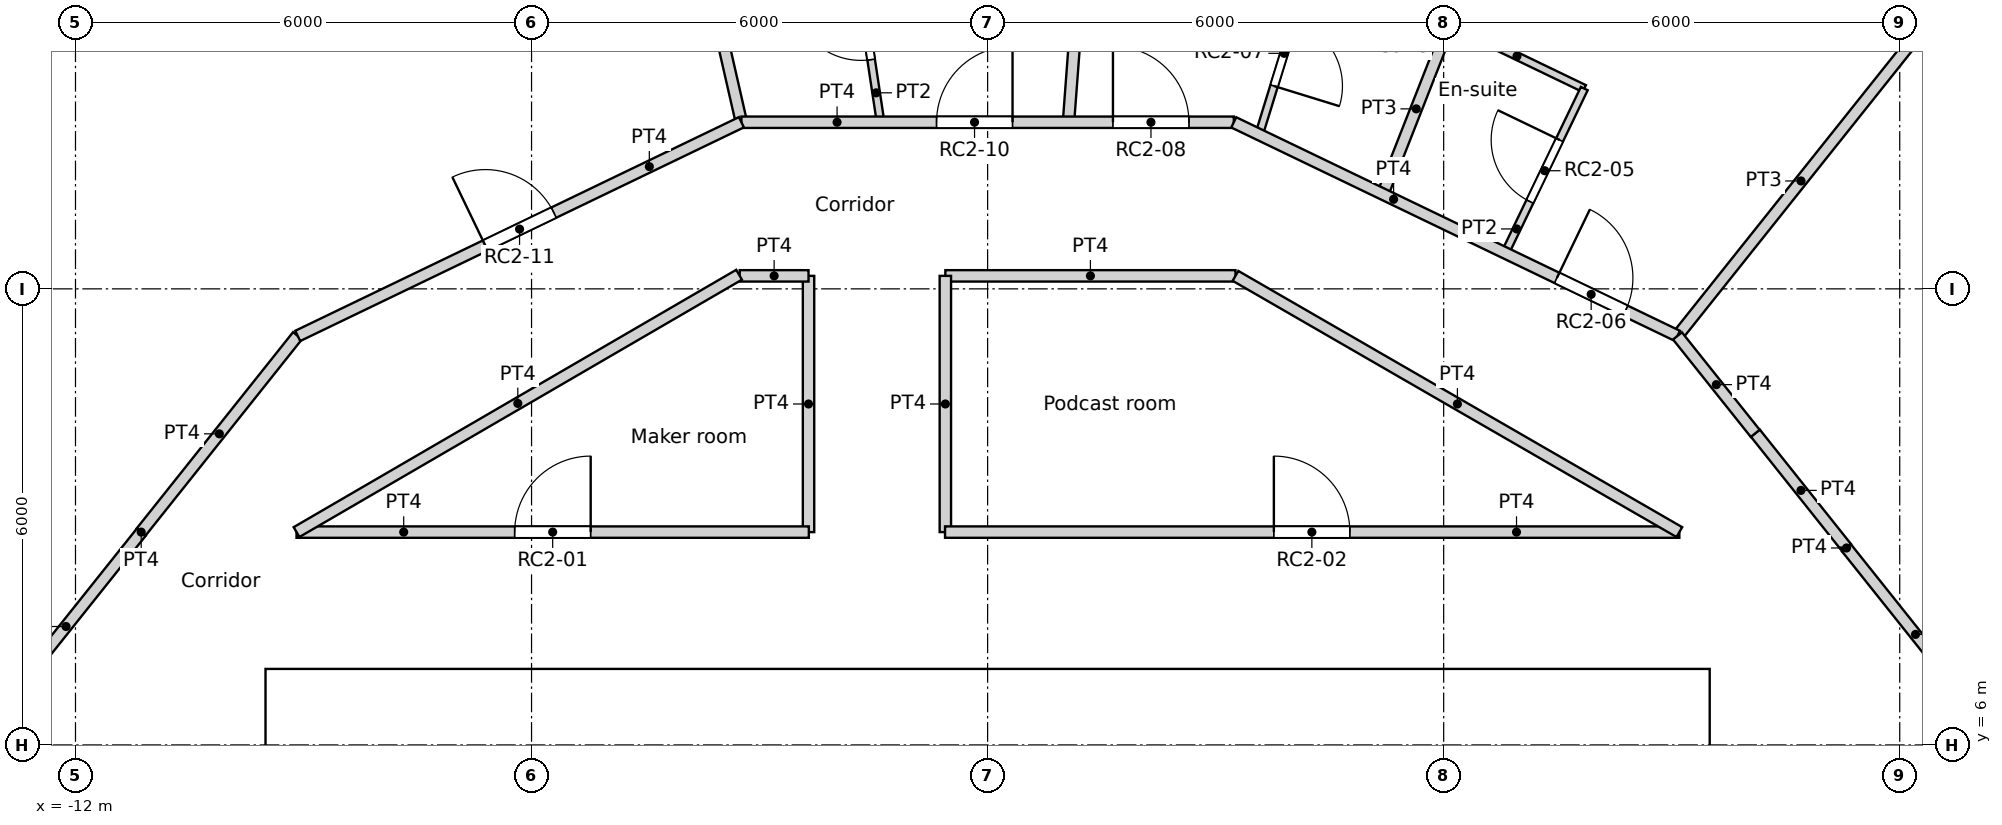
"""IFC4 building model, lengths in metres.
Left out: names, types, materials, properties, quantities, classifications, styles, units other than length and angle.
Written with IfcOpenShell. Run it as: python <this file> out.ifc"""

import sys

from ifc_helpers import new_model, si_unit, direction, frame, frame_2d, origin, origin_2d, place, context, subcontext, project, spatial, rectangle, circle, extrude, element, fill, save


model = new_model("IFC4")
c1 = context("Model", 3, precision=1e-05, world=origin(), true_north=direction((0.0, 1.0)))
c2 = subcontext(c1, "Body", "Model", "MODEL_VIEW")
j1 = project(units=[si_unit("LENGTHUNIT", "METRE"), si_unit("PLANEANGLEUNIT", "RADIAN")], contexts=[c1])
p1 = place(None, origin())
s1 = spatial("IfcSite", under=j1, at=p1, CompositionType="ELEMENT")
p2 = place(p1, origin())
s2 = spatial("IfcBuilding", under=s1, at=p2, CompositionType="ELEMENT")
p3 = place(p2, frame((0.0, 0.0, 241.8)))
s3 = spatial("IfcBuildingStorey", under=s2, at=p3, CompositionType="ELEMENT", Elevation=241.8)
p4 = place(p3, frame((11.735, 14.716, 0.0), z_axis=(0.0, 0.0, 1.0), x_axis=(1.0, 0.0, 0.0)))
e1 = element("IfcColumn", 1, at=p4, inside=s3, PredefinedType="COLUMN", context=c2, shape_type="SweptSolid", body=[
    extrude(circle(Radius=0.55, at=origin_2d()), origin(), (0.0, 0.0, 1.0), 3.6),
])
p5 = place(p3, frame((-9.5, 6.7, 0.0), z_axis=(0.0, 0.0, 1.0), x_axis=(1.0, 0.0, 0.0)))
e2 = element("IfcWall", 2, at=p5, inside=s3, PredefinedType="SOLIDWALL", context=c2, shape_type="SweptSolid", body=[
    extrude(rectangle(XDim=19.0, YDim=0.6, at=frame_2d((9.5, 0.0))), origin(), (0.0, 0.0, 1.0), 3.6),
])
p6 = place(p5, frame((5.35, 0.0, 0.0)))
e3 = element("IfcOpeningElement", 3, at=p6, cuts=e2, PredefinedType="OPENING", context=c2, shape_type="SweptSolid", body=[
    extrude(rectangle(XDim=1.7, YDim=2.1, at=frame_2d((0.85, 1.05))), frame((0.0, 0.3, 0.0), z_axis=(0.0, -1.0, 0.0), x_axis=(1.0, 0.0, 0.0)), (0.0, 0.0, 1.0), 0.6),
])
p7 = place(p3, frame((-9.2, -6.4, 0.0), z_axis=(0.0, 0.0, 1.0), x_axis=(0.0, 1.0, 0.0)))
e4 = element("IfcWall", 4, at=p7, inside=s3, PredefinedType="SOLIDWALL", context=c2, shape_type="SweptSolid", body=[
    extrude(rectangle(XDim=12.8, YDim=0.6, at=frame_2d((6.4, 0.0))), origin(), (0.0, 0.0, 1.0), 3.6),
])
p8 = place(p3, frame((9.2, -6.4, 0.0), z_axis=(0.0, 0.0, 1.0), x_axis=(0.0, 1.0, 0.0)))
e5 = element("IfcWall", 5, at=p8, inside=s3, PredefinedType="SOLIDWALL", context=c2, shape_type="SweptSolid", body=[
    extrude(rectangle(XDim=12.8, YDim=0.6, at=frame_2d((6.4, 0.0))), origin(), (0.0, 0.0, 1.0), 3.6),
])
p9 = place(p8, frame((6.4, 0.0, 0.0)))
e6 = element("IfcOpeningElement", 6, at=p9, cuts=e5, PredefinedType="OPENING", context=c2, shape_type="SweptSolid", body=[
    extrude(rectangle(XDim=1.8, YDim=2.1, at=frame_2d((0.9, 1.05))), frame((0.0, 0.3, 0.0), z_axis=(0.0, -1.0, 0.0), x_axis=(1.0, 0.0, 0.0)), (0.0, 0.0, 1.0), 0.6),
])
for number, where, z_axis, x_axis in (
    (7, (-2.25, 3.25, 0.0), (0.0, 0.0, 1.0), (0.0, 1.0, 0.0)),
    (8, (0.55, 3.25, 0.0), (0.0, 0.0, 1.0), (0.0, 1.0, 0.0)),
    (9, (3.35, 3.25, 0.0), (0.0, 0.0, 1.0), (0.0, 1.0, 0.0)),
    (10, (6.15, 3.25, 0.0), (0.0, 0.0, 1.0), (0.0, 1.0, 0.0)),
):
    element("IfcWall", number, at=place(p3, frame(where, z_axis=z_axis, x_axis=x_axis)), inside=s3, PredefinedType="SOLIDWALL", context=c2, shape_type="SweptSolid", body=[
        extrude(rectangle(XDim=3.15, YDim=0.3, at=frame_2d((1.575, 0.0))), origin(), (0.0, 0.0, 1.0), 3.25),
    ])
p10 = place(p3, frame((-9.092, 8.8, 0.0), z_axis=(0.0, 0.0, 1.0), x_axis=(0.864470922103, 0.502682827277, 0.0)))
e11 = element("IfcWall", 11, at=p10, inside=s3, PredefinedType="PARTITIONING", context=c2, shape_type="SweptSolid", body=[
    extrude(rectangle(XDim=6.735, YDim=0.15, at=frame_2d((3.368, 0.0))), origin(), (0.0, 0.0, 1.0), 3.25),
])
p11 = place(p3, frame((-9.092, 8.8, 0.0), z_axis=(0.0, 0.0, 1.0), x_axis=(1.0, 0.0, 0.0)))
e12 = element("IfcWall", 12, at=p11, inside=s3, PredefinedType="PARTITIONING", context=c2, shape_type="SweptSolid", body=[
    extrude(rectangle(XDim=6.74, YDim=0.15, at=frame_2d((3.37, 0.0))), origin(), (0.0, 0.0, 1.0), 3.25),
])
p12 = place(p11, frame((2.87, 0.0, 0.0)))
e13 = element("IfcOpeningElement", 13, at=p12, cuts=e12, PredefinedType="OPENING", context=c2, shape_type="SweptSolid", body=[
    extrude(rectangle(XDim=1.0, YDim=2.04, at=frame_2d((0.5, 1.02))), frame((0.0, 0.075, 0.0), z_axis=(0.0, -1.0, 0.0), x_axis=(1.0, 0.0, 0.0)), (0.0, 0.0, 1.0), 0.15),
])
p13 = place(p3, frame((-0.56, 8.8, 0.0), z_axis=(0.0, 0.0, 1.0), x_axis=(1.0, 0.0, 0.0)))
e14 = element("IfcWall", 14, at=p13, inside=s3, PredefinedType="PARTITIONING", context=c2, shape_type="SweptSolid", body=[
    extrude(rectangle(XDim=9.661, YDim=0.15, at=frame_2d((4.83, 0.0))), origin(), (0.0, 0.0, 1.0), 3.25),
])
p14 = place(p13, frame((4.326, 0.0, 0.0)))
e15 = element("IfcOpeningElement", 15, at=p14, cuts=e14, PredefinedType="OPENING", context=c2, shape_type="SweptSolid", body=[
    extrude(rectangle(XDim=1.0, YDim=2.04, at=frame_2d((0.5, 1.02))), frame((0.0, 0.075, 0.0), z_axis=(0.0, -1.0, 0.0), x_axis=(1.0, 0.0, 0.0)), (0.0, 0.0, 1.0), 0.15),
])
p15 = place(p3, frame((10.101, 10.101, 0.0), z_axis=(0.0, 0.0, 1.0), x_axis=(0.623130947784, -0.782117524362, 0.0)))
e16 = element("IfcWall", 16, at=p15, inside=s3, PredefinedType="PARTITIONING", context=c2, shape_type="SweptSolid", body=[
    extrude(rectangle(XDim=1.924, YDim=0.15, at=frame_2d((0.962, 0.0))), origin(), (0.0, 0.0, 1.0), 3.25),
])
p16 = place(p3, frame((11.3, 8.586, 0.0), z_axis=(0.0, 0.0, 1.0), x_axis=(0.0, 1.0, 0.0)))
e17 = element("IfcWall", 17, at=p16, inside=s3, PredefinedType="PARTITIONING", context=c2, shape_type="SweptSolid", body=[
    extrude(rectangle(XDim=0.01, YDim=0.15, at=frame_2d((0.005, 0.0))), origin(), (0.0, 0.0, 1.0), 3.25),
])
p17 = place(p3, frame((-11.134, 8.8, 0.0), z_axis=(0.0, 0.0, 1.0), x_axis=(-1.0, 0.0, 0.0)))
e18 = element("IfcWall", 18, at=p17, inside=s3, PredefinedType="PARTITIONING", context=c2, shape_type="SweptSolid", body=[
    extrude(rectangle(XDim=0.003, YDim=0.15, at=frame_2d((0.001, 0.0))), origin(), (0.0, 0.0, 1.0), 3.25),
])
p18 = place(p3, frame((-11.136, 8.802, 0.0), z_axis=(0.0, 0.0, 1.0), x_axis=(0.623151397235, 0.782101231379, 0.0)))
e19 = element("IfcWall", 19, at=p18, inside=s3, PredefinedType="PARTITIONING", context=c2, shape_type="SweptSolid", body=[
    extrude(rectangle(XDim=3.301, YDim=0.15, at=frame_2d((1.65, 0.0))), origin(), (0.0, 0.0, 1.0), 3.25),
])
p19 = place(p3, frame((11.3, 8.592, 0.0), z_axis=(0.0, 0.0, 1.0), x_axis=(0.623446514299, -0.781866001185, 0.0)))
e20 = element("IfcWall", 20, at=p19, inside=s3, PredefinedType="PARTITIONING", context=c2, shape_type="SweptSolid", body=[
    extrude(rectangle(XDim=2.911, YDim=0.15, at=frame_2d((1.456, 0.0))), origin(), (0.0, 0.0, 1.0), 3.25),
])
p20 = place(p3, frame((-2.356, 8.8, 0.0), z_axis=(0.0, 0.0, 1.0), x_axis=(0.0, 1.0, 0.0)))
e21 = element("IfcWall", 21, at=p20, inside=s3, PredefinedType="PARTITIONING", context=c2, shape_type="SweptSolid", body=[
    extrude(rectangle(XDim=3.371, YDim=0.15, at=frame_2d((1.686, 0.0))), origin(), (0.0, 0.0, 1.0), 3.25),
])
p21 = place(p3, frame((-3.261, 12.171, 0.0), z_axis=(0.0, 0.0, 1.0), x_axis=(1.0, 0.0, 0.0)))
e22 = element("IfcWall", 22, at=p21, inside=s3, PredefinedType="PARTITIONING", context=c2, shape_type="SweptSolid", body=[
    extrude(rectangle(XDim=0.905, YDim=0.15, at=frame_2d((0.453, 0.0))), origin(), (0.0, 0.0, 1.0), 3.25),
])
p22 = place(p3, frame((3.261, 12.171, 0.0), z_axis=(0.0, 0.0, 1.0), x_axis=(0.866066809554, -0.499928276245, 0.0)))
e23 = element("IfcWall", 23, at=p22, inside=s3, PredefinedType="PARTITIONING", context=c2, shape_type="SweptSolid", body=[
    extrude(rectangle(XDim=6.743, YDim=0.15, at=frame_2d((3.371, 0.0))), origin(), (0.0, 0.0, 1.0), 3.25),
])
p23 = place(p3, frame((-0.556, 12.171, 0.0), z_axis=(0.0, 0.0, 1.0), x_axis=(1.0, 0.0, 0.0)))
e24 = element("IfcWall", 24, at=p23, inside=s3, PredefinedType="PARTITIONING", context=c2, shape_type="SweptSolid", body=[
    extrude(rectangle(XDim=3.817, YDim=0.15, at=frame_2d((1.908, 0.0))), origin(), (0.0, 0.0, 1.0), 3.25),
])
p24 = place(p3, frame((-0.556, 8.8, 0.0), z_axis=(0.0, 0.0, 1.0), x_axis=(0.0, 1.0, 0.0)))
e25 = element("IfcWall", 25, at=p24, inside=s3, PredefinedType="PARTITIONING", context=c2, shape_type="SweptSolid", body=[
    extrude(rectangle(XDim=3.371, YDim=0.15, at=frame_2d((1.686, 0.0))), origin(), (0.0, 0.0, 1.0), 3.25),
])
p25 = place(p3, frame((9.076, 11.381, 0.0), z_axis=(0.0, 0.0, 1.0), x_axis=(0.623805208652, -0.781579849829, 0.0)))
e26 = element("IfcWall", 26, at=p25, inside=s3, PredefinedType="PARTITIONING", context=c2, shape_type="SweptSolid", body=[
    extrude(rectangle(XDim=1.64, YDim=0.15, at=frame_2d((0.82, 0.0))), origin(), (0.0, 0.0, 1.0), 3.25),
])
p26 = place(p3, frame((3.238, 14.191, 0.0), z_axis=(0.0, 0.0, 1.0), x_axis=(0.901070942113, -0.433671716024, 0.0)))
e27 = element("IfcWall", 27, at=p26, inside=s3, PredefinedType="PARTITIONING", context=c2, shape_type="SweptSolid", body=[
    extrude(rectangle(XDim=6.479, YDim=0.15, at=frame_2d((3.239, 0.0))), origin(), (0.0, 0.0, 1.0), 3.25),
])
p27 = place(p26, frame((4.718, 0.0, 0.0)))
e28 = element("IfcOpeningElement", 28, at=p27, cuts=e27, PredefinedType="OPENING", context=c2, shape_type="SweptSolid", body=[
    extrude(rectangle(XDim=1.0, YDim=2.1, at=frame_2d((0.5, 1.05))), frame((0.0, 0.075, 0.0), z_axis=(0.0, -1.0, 0.0), x_axis=(1.0, 0.0, 0.0)), (0.0, 0.0, 1.0), 0.15),
])
p28 = place(p3, frame((-3.239, 14.192, 0.0), z_axis=(0.0, 0.0, 1.0), x_axis=(1.0, 0.0, 0.0)))
e29 = element("IfcWall", 29, at=p28, inside=s3, PredefinedType="PARTITIONING", context=c2, shape_type="SweptSolid", body=[
    extrude(rectangle(XDim=6.478, YDim=0.15, at=frame_2d((3.239, 0.0))), origin(), (0.0, 0.0, 1.0), 3.25),
])
p29 = place(p28, frame((4.888, 0.0, 0.0)))
e30 = element("IfcOpeningElement", 30, at=p29, cuts=e29, PredefinedType="OPENING", context=c2, shape_type="SweptSolid", body=[
    extrude(rectangle(XDim=1.0, YDim=2.1, at=frame_2d((0.5, 1.05))), frame((0.0, 0.075, 0.0), z_axis=(0.0, -1.0, 0.0), x_axis=(1.0, 0.0, 0.0)), (0.0, 0.0, 1.0), 0.15),
])
p30 = place(p28, frame((2.567, 0.0, 0.0)))
e31 = element("IfcOpeningElement", 31, at=p30, cuts=e29, PredefinedType="OPENING", context=c2, shape_type="SweptSolid", body=[
    extrude(rectangle(XDim=1.0, YDim=2.1, at=frame_2d((0.5, 1.05))), frame((0.0, 0.075, 0.0), z_axis=(0.0, -1.0, 0.0), x_axis=(1.0, 0.0, 0.0)), (0.0, 0.0, 1.0), 0.15),
])
p31 = place(p3, frame((-9.076, 11.381, 0.0), z_axis=(0.0, 0.0, 1.0), x_axis=(0.900976027191, 0.433868872388, 0.0)))
e32 = element("IfcWall", 32, at=p31, inside=s3, PredefinedType="PARTITIONING", context=c2, shape_type="SweptSolid", body=[
    extrude(rectangle(XDim=6.479, YDim=0.15, at=frame_2d((3.239, 0.0))), origin(), (0.0, 0.0, 1.0), 3.25),
])
p32 = place(p31, frame((2.739, 0.0, 0.0)))
e33 = element("IfcOpeningElement", 33, at=p32, cuts=e32, PredefinedType="OPENING", context=c2, shape_type="SweptSolid", body=[
    extrude(rectangle(XDim=1.0, YDim=2.04, at=frame_2d((0.5, 1.02))), frame((0.0, 0.075, 0.0), z_axis=(0.0, -1.0, 0.0), x_axis=(1.0, 0.0, 0.0)), (0.0, 0.0, 1.0), 0.15),
])
p33 = place(p3, frame((-13.115, 6.316, 0.0), z_axis=(0.0, 0.0, 1.0), x_axis=(0.623476099415, 0.781842409606, 0.0)))
e34 = element("IfcWall", 34, at=p33, inside=s3, PredefinedType="PARTITIONING", context=c2, shape_type="SweptSolid", body=[
    extrude(rectangle(XDim=3.177, YDim=0.15, at=frame_2d((1.589, 0.0))), origin(), (0.0, 0.0, 1.0), 3.25),
])
p34 = place(p3, frame((9.076, 11.381, 0.0), z_axis=(0.0, 0.0, 1.0), x_axis=(0.623460949534, 0.781854490558, 0.0)))
e35 = element("IfcWall", 35, at=p34, inside=s3, PredefinedType="PARTITIONING", context=c2, shape_type="SweptSolid", body=[
    extrude(rectangle(XDim=5.214, YDim=0.15, at=frame_2d((2.607, 0.0))), origin(), (0.0, 0.0, 1.0), 3.25),
])
p35 = place(p3, frame((6.809, 12.473, 0.0), z_axis=(0.0, 0.0, 1.0), x_axis=(0.433815618773, 0.901001669759, 0.0)))
e36 = element("IfcWall", 36, at=p35, inside=s3, PredefinedType="PARTITIONING", context=c2, shape_type="SweptSolid", body=[
    extrude(rectangle(XDim=2.4, YDim=0.1, at=frame_2d((1.2, 0.0))), origin(), (0.0, 0.0, 1.0), 3.25),
])
p36 = place(p35, frame((0.75, 0.0, 0.0)))
e37 = element("IfcOpeningElement", 37, at=p36, cuts=e36, PredefinedType="OPENING", context=c2, shape_type="SweptSolid", body=[
    extrude(rectangle(XDim=0.9, YDim=2.04, at=frame_2d((0.45, 1.02))), frame((0.0, 0.05, 0.0), z_axis=(0.0, -1.0, 0.0), x_axis=(1.0, 0.0, 0.0)), (0.0, 0.0, 1.0), 0.1),
])
p37 = place(p3, frame((6.079, 15.488, 0.0), z_axis=(0.0, 0.0, 1.0), x_axis=(0.900936932599, -0.433950047216, 0.0)))
e38 = element("IfcWall", 38, at=p37, inside=s3, PredefinedType="PARTITIONING", context=c2, shape_type="SweptSolid", body=[
    extrude(rectangle(XDim=1.966, YDim=0.1, at=frame_2d((0.983, 0.0))), origin(), (0.0, 0.0, 1.0), 3.25),
])
p38 = place(p3, frame((5.199, 13.248, 0.0), z_axis=(0.0, 0.0, 1.0), x_axis=(0.365699450144, 0.930732997247, 0.0)))
e39 = element("IfcWall", 39, at=p38, inside=s3, PredefinedType="PARTITIONING", context=c2, shape_type="SweptSolid", body=[
    extrude(rectangle(XDim=2.407, YDim=0.15, at=frame_2d((1.203, 0.0))), origin(), (0.0, 0.0, 1.0), 3.25),
])
p39 = place(p3, frame((3.572, 14.032, 0.0), z_axis=(0.0, 0.0, 1.0), x_axis=(0.295030507093, 0.955487833457, 0.0)))
e40 = element("IfcWall", 40, at=p39, inside=s3, PredefinedType="PARTITIONING", context=c2, shape_type="SweptSolid", body=[
    extrude(rectangle(XDim=2.233, YDim=0.1, at=frame_2d((1.117, 0.0))), origin(), (0.0, 0.0, 1.0), 3.25),
])
p40 = place(p39, frame((0.667, 0.0, 0.0)))
e41 = element("IfcOpeningElement", 41, at=p40, cuts=e40, PredefinedType="OPENING", context=c2, shape_type="SweptSolid", body=[
    extrude(rectangle(XDim=0.9, YDim=2.04, at=frame_2d((0.45, 1.02))), frame((0.0, 0.05, 0.0), z_axis=(0.0, -1.0, 0.0), x_axis=(1.0, 0.0, 0.0)), (0.0, 0.0, 1.0), 0.1),
])
p41 = place(p3, frame((1.064, 14.192, 0.0), z_axis=(0.0, 0.0, 1.0), x_axis=(0.074745027699, 0.997202677912, 0.0)))
e42 = element("IfcWall", 42, at=p41, inside=s3, PredefinedType="PARTITIONING", context=c2, shape_type="SweptSolid", body=[
    extrude(rectangle(XDim=5.54, YDim=0.15, at=frame_2d((2.77, 0.0))), origin(), (0.0, 0.0, 1.0), 3.25),
])
p42 = place(p3, frame((-1.791, 16.729, 0.0), z_axis=(0.0, 0.0, 1.0), x_axis=(0.149289553133, -0.988793522089, 0.0)))
e43 = element("IfcWall", 43, at=p42, inside=s3, PredefinedType="PARTITIONING", context=c2, shape_type="SweptSolid", body=[
    extrude(rectangle(XDim=2.566, YDim=0.1, at=frame_2d((1.283, 0.0))), origin(), (0.0, 0.0, 1.0), 3.25),
])
p43 = place(p42, frame((0.833, 0.0, 0.0)))
e44 = element("IfcOpeningElement", 44, at=p43, cuts=e43, PredefinedType="OPENING", context=c2, shape_type="SweptSolid", body=[
    extrude(rectangle(XDim=0.9, YDim=2.04, at=frame_2d((0.45, 1.02))), frame((0.0, 0.05, 0.0), z_axis=(0.0, -1.0, 0.0), x_axis=(1.0, 0.0, 0.0)), (0.0, 0.0, 1.0), 0.1),
])
p44 = place(p3, frame((-4.4, 19.276, 0.0), z_axis=(0.0, 0.0, 1.0), x_axis=(0.222612505682, -0.974907007008, 0.0)))
e45 = element("IfcWall", 45, at=p44, inside=s3, PredefinedType="PARTITIONING", context=c2, shape_type="SweptSolid", body=[
    extrude(rectangle(XDim=5.215, YDim=0.15, at=frame_2d((2.607, 0.0))), origin(), (0.0, 0.0, 1.0), 3.25),
])
p45 = place(p6, origin())
e46 = element("IfcDoor", 46, at=p45, inside=s3, OperationType="DOUBLE_DOOR_SINGLE_SWING", PredefinedType="DOOR", context=c2, shape_type="SweptSolid", body=[
    extrude(rectangle(XDim=1.7, YDim=2.1, at=frame_2d((0.85, 1.05))), frame((0.0, 0.025, 0.0), z_axis=(0.0, -1.0, 0.0), x_axis=(1.0, 0.0, 0.0)), (0.0, 0.0, 1.0), 0.05),
])
fill(e3, e46)
p46 = place(p12, origin())
e47 = element("IfcDoor", 47, at=p46, inside=s3, OperationType="SINGLE_SWING_RIGHT", PredefinedType="DOOR", context=c2, shape_type="SweptSolid", body=[
    extrude(rectangle(XDim=1.0, YDim=2.04, at=frame_2d((0.5, 1.02))), frame((0.0, 0.025, 0.0), z_axis=(0.0, -1.0, 0.0), x_axis=(1.0, 0.0, 0.0)), (0.0, 0.0, 1.0), 0.05),
])
fill(e13, e47)
p47 = place(p14, origin())
e48 = element("IfcDoor", 48, at=p47, inside=s3, OperationType="SINGLE_SWING_LEFT", PredefinedType="DOOR", context=c2, shape_type="SweptSolid", body=[
    extrude(rectangle(XDim=1.0, YDim=2.04, at=frame_2d((0.5, 1.02))), frame((0.0, 0.025, 0.0), z_axis=(0.0, -1.0, 0.0), x_axis=(1.0, 0.0, 0.0)), (0.0, 0.0, 1.0), 0.05),
])
fill(e15, e48)
p48 = place(p36, origin())
e49 = element("IfcDoor", 49, at=p48, inside=s3, OperationType="SINGLE_SWING_RIGHT", PredefinedType="DOOR", context=c2, shape_type="SweptSolid", body=[
    extrude(rectangle(XDim=0.9, YDim=2.04, at=frame_2d((0.45, 1.02))), frame((0.0, 0.025, 0.0), z_axis=(0.0, -1.0, 0.0), x_axis=(1.0, 0.0, 0.0)), (0.0, 0.0, 1.0), 0.05),
])
fill(e37, e49)
p49 = place(p27, origin())
e50 = element("IfcDoor", 50, at=p49, inside=s3, OperationType="SINGLE_SWING_LEFT", PredefinedType="DOOR", context=c2, shape_type="SweptSolid", body=[
    extrude(rectangle(XDim=1.0, YDim=2.1, at=frame_2d((0.5, 1.05))), frame((0.0, 0.025, 0.0), z_axis=(0.0, -1.0, 0.0), x_axis=(1.0, 0.0, 0.0)), (0.0, 0.0, 1.0), 0.05),
])
fill(e28, e50)
p50 = place(p40, origin())
e51 = element("IfcDoor", 51, at=p50, inside=s3, OperationType="SINGLE_SWING_RIGHT", PredefinedType="DOOR", context=c2, shape_type="SweptSolid", body=[
    extrude(rectangle(XDim=0.9, YDim=2.04, at=frame_2d((0.45, 1.02))), frame((0.0, 0.025, 0.0), z_axis=(0.0, -1.0, 0.0), x_axis=(1.0, 0.0, 0.0)), (0.0, 0.0, 1.0), 0.05),
])
fill(e41, e51)
p51 = place(p29, origin())
e52 = element("IfcDoor", 52, at=p51, inside=s3, OperationType="SINGLE_SWING_LEFT", PredefinedType="DOOR", context=c2, shape_type="SweptSolid", body=[
    extrude(rectangle(XDim=1.0, YDim=2.1, at=frame_2d((0.5, 1.05))), frame((0.0, 0.025, 0.0), z_axis=(0.0, -1.0, 0.0), x_axis=(1.0, 0.0, 0.0)), (0.0, 0.0, 1.0), 0.05),
])
fill(e30, e52)
p52 = place(p43, origin())
e53 = element("IfcDoor", 53, at=p52, inside=s3, OperationType="SINGLE_SWING_RIGHT", PredefinedType="DOOR", context=c2, shape_type="SweptSolid", body=[
    extrude(rectangle(XDim=0.9, YDim=2.04, at=frame_2d((0.45, 1.02))), frame((0.0, 0.025, 0.0), z_axis=(0.0, -1.0, 0.0), x_axis=(1.0, 0.0, 0.0)), (0.0, 0.0, 1.0), 0.05),
])
fill(e44, e53)
p53 = place(p30, origin())
e54 = element("IfcDoor", 54, at=p53, inside=s3, OperationType="SINGLE_SWING_RIGHT", PredefinedType="DOOR", context=c2, shape_type="SweptSolid", body=[
    extrude(rectangle(XDim=1.0, YDim=2.1, at=frame_2d((0.5, 1.05))), frame((0.0, 0.025, 0.0), z_axis=(0.0, -1.0, 0.0), x_axis=(1.0, 0.0, 0.0)), (0.0, 0.0, 1.0), 0.05),
])
fill(e31, e54)
p54 = place(p32, origin())
e55 = element("IfcDoor", 55, at=p54, inside=s3, OperationType="SINGLE_SWING_LEFT", PredefinedType="DOOR", context=c2, shape_type="SweptSolid", body=[
    extrude(rectangle(XDim=1.0, YDim=2.04, at=frame_2d((0.5, 1.02))), frame((0.0, 0.025, 0.0), z_axis=(0.0, -1.0, 0.0), x_axis=(1.0, 0.0, 0.0)), (0.0, 0.0, 1.0), 0.05),
])
fill(e33, e55)
save(model, sys.argv[1])
